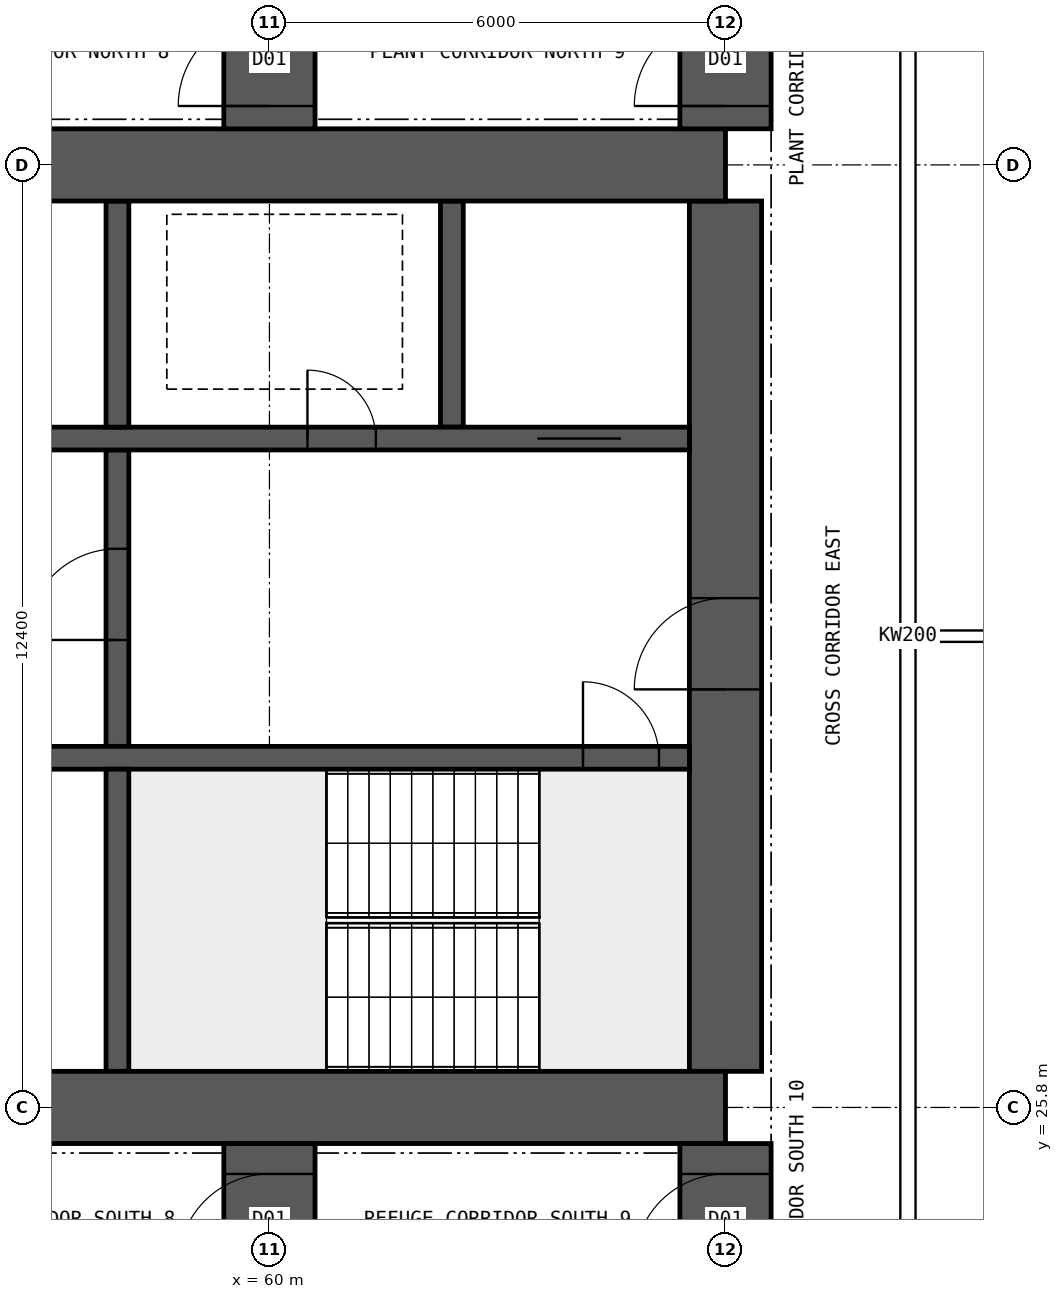
"""IFC4 building model, lengths in metres.
Left out: names, types, materials, properties, quantities, classifications, styles, units other than length and angle.
Written with IfcOpenShell. Run it as: python <this file> out.ifc"""

import sys

from ifc_helpers import new_model, si_unit, direction, frame, frame_2d, origin, place, context, subcontext, project, spatial, polyline, rectangle, outline, extrude, element, fill, save


model = new_model("IFC4")
c1 = context("Model", 3, precision=1e-05, world=origin(), true_north=direction((0.0, 1.0)))
c2 = subcontext(c1, "Body", "Model", "MODEL_VIEW")
j1 = project(units=[si_unit("LENGTHUNIT", "METRE"), si_unit("PLANEANGLEUNIT", "RADIAN")], contexts=[c1])
p1 = place(None, origin())
s1 = spatial("IfcSite", under=j1, at=p1, CompositionType="ELEMENT")
p2 = place(p1, origin())
s2 = spatial("IfcBuilding", under=s1, at=p2, CompositionType="ELEMENT")
p3 = place(p2, frame((0.0, 0.0, 133.15)))
s3 = spatial("IfcBuildingStorey", under=s2, at=p3, CompositionType="ELEMENT", Elevation=133.15)
for number, where, z_axis, x_axis in (
    (1, (18.0, 25.8, 0.0), (0.0, 0.0, 1.0), (1.0, 0.0, 0.0)),
    (2, (18.0, 38.2, 0.0), (0.0, 0.0, 1.0), (1.0, 0.0, 0.0)),
):
    element("IfcWall", number, at=place(p3, frame(where, z_axis=z_axis, x_axis=x_axis)), inside=s3, PredefinedType="SHEAR", context=c2, shape_type="SweptSolid", body=[
        extrude(rectangle(XDim=48.0, YDim=0.95, at=frame_2d((24.0, 0.0))), origin(), (0.0, 0.0, 1.0), 7.2),
    ])
p4 = place(p3, frame((66.0, 26.275, 0.0), z_axis=(0.0, 0.0, 1.0), x_axis=(0.0, 1.0, 0.0)))
e3 = element("IfcWall", 3, at=p4, inside=s3, PredefinedType="SHEAR", context=c2, shape_type="SweptSolid", body=[
    extrude(rectangle(XDim=11.45, YDim=0.95, at=frame_2d((5.725, 0.0))), origin(), (0.0, 0.0, 1.0), 7.2),
])
p5 = place(p4, frame((5.025, 0.0, 0.0)))
e4 = element("IfcOpeningElement", 4, at=p5, cuts=e3, PredefinedType="OPENING", context=c2, shape_type="SweptSolid", body=[
    extrude(rectangle(XDim=1.2, YDim=2.1, at=frame_2d((0.6, 1.05))), frame((0.0, 0.485, 0.0), z_axis=(0.0, -1.0, 0.0), x_axis=(1.0, 0.0, 0.0)), (0.0, 0.0, 1.0), 0.97),
])
p6 = place(p3, frame((18.475, 30.4, 0.0), z_axis=(0.0, 0.0, 1.0), x_axis=(1.0, 0.0, 0.0)))
e5 = element("IfcWall", 5, at=p6, inside=s3, PredefinedType="SHEAR", context=c2, shape_type="SweptSolid", body=[
    extrude(rectangle(XDim=47.05, YDim=0.3, at=frame_2d((23.525, 0.0))), origin(), (0.0, 0.0, 1.0), 7.2),
])
p7 = place(p6, frame((0.4, 0.0, 0.0)))
e6 = element("IfcOpeningElement", 6, at=p7, cuts=e5, PredefinedType="OPENING", context=c2, shape_type="SweptSolid", body=[
    extrude(rectangle(XDim=1.0, YDim=2.1, at=frame_2d((0.5, 1.05))), frame((0.0, 0.16, 0.0), z_axis=(0.0, -1.0, 0.0), x_axis=(1.0, 0.0, 0.0)), (0.0, 0.0, 1.0), 0.32),
])
p8 = place(p6, frame((45.65, 0.0, 0.0)))
e7 = element("IfcOpeningElement", 7, at=p8, cuts=e5, PredefinedType="OPENING", context=c2, shape_type="SweptSolid", body=[
    extrude(rectangle(XDim=1.0, YDim=2.1, at=frame_2d((0.5, 1.05))), frame((0.0, 0.16, 0.0), z_axis=(0.0, -1.0, 0.0), x_axis=(1.0, 0.0, 0.0)), (0.0, 0.0, 1.0), 0.32),
])
p9 = place(p6, frame((18.85, 0.0, 0.0)))
e8 = element("IfcOpeningElement", 8, at=p9, cuts=e5, PredefinedType="OPENING", context=c2, shape_type="SweptSolid", body=[
    extrude(rectangle(XDim=0.9, YDim=2.1, at=frame_2d((0.45, 1.05))), frame((0.0, 0.16, 0.0), z_axis=(0.0, -1.0, 0.0), x_axis=(1.0, 0.0, 0.0)), (0.0, 0.0, 1.0), 0.32),
])
p10 = place(p6, frame((30.142, 0.0, 0.0)))
e9 = element("IfcOpeningElement", 9, at=p10, cuts=e5, PredefinedType="OPENING", context=c2, shape_type="SweptSolid", body=[
    extrude(rectangle(XDim=1.1, YDim=2.1, at=frame_2d((0.55, 1.05))), frame((0.0, 0.16, 0.0), z_axis=(0.0, -1.0, 0.0), x_axis=(1.0, 0.0, 0.0)), (0.0, 0.0, 1.0), 0.32),
])
p11 = place(p6, frame((33.675, 0.0, 0.0)))
e10 = element("IfcOpeningElement", 10, at=p11, cuts=e5, PredefinedType="OPENING", context=c2, shape_type="SweptSolid", body=[
    extrude(rectangle(XDim=1.1, YDim=2.1, at=frame_2d((0.55, 1.05))), frame((0.0, 0.16, 0.0), z_axis=(0.0, -1.0, 0.0), x_axis=(1.0, 0.0, 0.0)), (0.0, 0.0, 1.0), 0.32),
])
p12 = place(p6, frame((37.208, 0.0, 0.0)))
e11 = element("IfcOpeningElement", 11, at=p12, cuts=e5, PredefinedType="OPENING", context=c2, shape_type="SweptSolid", body=[
    extrude(rectangle(XDim=1.1, YDim=2.1, at=frame_2d((0.55, 1.05))), frame((0.0, 0.16, 0.0), z_axis=(0.0, -1.0, 0.0), x_axis=(1.0, 0.0, 0.0)), (0.0, 0.0, 1.0), 0.32),
])
p13 = place(p3, frame((18.475, 34.6, 0.0), z_axis=(0.0, 0.0, 1.0), x_axis=(1.0, 0.0, 0.0)))
e12 = element("IfcWall", 12, at=p13, inside=s3, PredefinedType="SHEAR", context=c2, shape_type="SweptSolid", body=[
    extrude(rectangle(XDim=47.05, YDim=0.3, at=frame_2d((23.525, 0.0))), origin(), (0.0, 0.0, 1.0), 7.2),
])
p14 = place(p13, frame((0.9, 0.0, 0.0)))
e13 = element("IfcOpeningElement", 13, at=p14, cuts=e12, PredefinedType="OPENING", context=c2, shape_type="SweptSolid", body=[
    extrude(rectangle(XDim=1.1, YDim=2.1, at=frame_2d((0.55, 1.05))), frame((0.0, 0.16, 0.0), z_axis=(0.0, -1.0, 0.0), x_axis=(1.0, 0.0, 0.0)), (0.0, 0.0, 1.0), 0.32),
])
p15 = place(p13, frame((45.05, 0.0, 0.0)))
e14 = element("IfcOpeningElement", 14, at=p15, cuts=e12, PredefinedType="OPENING", context=c2, shape_type="SweptSolid", body=[
    extrude(rectangle(XDim=1.1, YDim=2.1, at=frame_2d((0.55, 1.05))), frame((0.0, 0.16, 0.0), z_axis=(0.0, -1.0, 0.0), x_axis=(1.0, 0.0, 0.0)), (0.0, 0.0, 1.0), 0.32),
])
p16 = place(p13, frame((4.125, 0.0, 0.0)))
e15 = element("IfcOpeningElement", 15, at=p16, cuts=e12, PredefinedType="OPENING", context=c2, shape_type="SweptSolid", body=[
    extrude(rectangle(XDim=0.9, YDim=2.1, at=frame_2d((0.45, 1.05))), frame((0.0, 0.16, 0.0), z_axis=(0.0, -1.0, 0.0), x_axis=(1.0, 0.0, 0.0)), (0.0, 0.0, 1.0), 0.32),
])
p17 = place(p13, frame((42.025, 0.0, 0.0)))
e16 = element("IfcOpeningElement", 16, at=p17, cuts=e12, PredefinedType="OPENING", context=c2, shape_type="SweptSolid", body=[
    extrude(rectangle(XDim=0.9, YDim=2.1, at=frame_2d((0.45, 1.05))), frame((0.0, 0.16, 0.0), z_axis=(0.0, -1.0, 0.0), x_axis=(1.0, 0.0, 0.0)), (0.0, 0.0, 1.0), 0.32),
])
p18 = place(p13, frame((8.9, 0.0, 0.0)))
e17 = element("IfcOpeningElement", 17, at=p18, cuts=e12, PredefinedType="OPENING", context=c2, shape_type="SweptSolid", body=[
    extrude(rectangle(XDim=0.9, YDim=2.1, at=frame_2d((0.45, 1.05))), frame((0.0, 0.16, 0.0), z_axis=(0.0, -1.0, 0.0), x_axis=(1.0, 0.0, 0.0)), (0.0, 0.0, 1.0), 0.32),
])
p19 = place(p13, frame((12.874, 0.0, 0.0)))
e18 = element("IfcOpeningElement", 18, at=p19, cuts=e12, PredefinedType="OPENING", context=c2, shape_type="SweptSolid", body=[
    extrude(rectangle(XDim=0.9, YDim=2.1, at=frame_2d((0.45, 1.05))), frame((0.0, 0.16, 0.0), z_axis=(0.0, -1.0, 0.0), x_axis=(1.0, 0.0, 0.0)), (0.0, 0.0, 1.0), 0.32),
])
p20 = place(p13, frame((16.521, 0.0, 0.0)))
e19 = element("IfcOpeningElement", 19, at=p20, cuts=e12, PredefinedType="OPENING", context=c2, shape_type="SweptSolid", body=[
    extrude(rectangle(XDim=0.9, YDim=2.1, at=frame_2d((0.45, 1.05))), frame((0.0, 0.16, 0.0), z_axis=(0.0, -1.0, 0.0), x_axis=(1.0, 0.0, 0.0)), (0.0, 0.0, 1.0), 0.32),
])
p21 = place(p13, frame((20.28, 0.0, 0.0)))
e20 = element("IfcOpeningElement", 20, at=p21, cuts=e12, PredefinedType="OPENING", context=c2, shape_type="SweptSolid", body=[
    extrude(rectangle(XDim=0.9, YDim=2.1, at=frame_2d((0.45, 1.05))), frame((0.0, 0.16, 0.0), z_axis=(0.0, -1.0, 0.0), x_axis=(1.0, 0.0, 0.0)), (0.0, 0.0, 1.0), 0.32),
])
p22 = place(p13, frame((24.686, 0.0, 0.0)))
e21 = element("IfcOpeningElement", 21, at=p22, cuts=e12, PredefinedType="OPENING", context=c2, shape_type="SweptSolid", body=[
    extrude(rectangle(XDim=0.9, YDim=2.1, at=frame_2d((0.45, 1.05))), frame((0.0, 0.16, 0.0), z_axis=(0.0, -1.0, 0.0), x_axis=(1.0, 0.0, 0.0)), (0.0, 0.0, 1.0), 0.32),
])
p23 = place(p13, frame((27.483, 0.0, 0.0)))
e22 = element("IfcOpeningElement", 22, at=p23, cuts=e12, PredefinedType="OPENING", context=c2, shape_type="SweptSolid", body=[
    extrude(rectangle(XDim=0.9, YDim=2.1, at=frame_2d((0.45, 1.05))), frame((0.0, 0.16, 0.0), z_axis=(0.0, -1.0, 0.0), x_axis=(1.0, 0.0, 0.0)), (0.0, 0.0, 1.0), 0.32),
])
p24 = place(p13, frame((33.604, 0.0, 0.0)))
e23 = element("IfcOpeningElement", 23, at=p24, cuts=e12, PredefinedType="OPENING", context=c2, shape_type="SweptSolid", body=[
    extrude(rectangle(XDim=0.9, YDim=2.1, at=frame_2d((0.45, 1.05))), frame((0.0, 0.16, 0.0), z_axis=(0.0, -1.0, 0.0), x_axis=(1.0, 0.0, 0.0)), (0.0, 0.0, 1.0), 0.32),
])
p25 = place(p3, frame((58.0, 26.275, 0.0), z_axis=(0.0, 0.0, 1.0), x_axis=(0.0, 1.0, 0.0)))
e24 = element("IfcWall", 24, at=p25, inside=s3, PredefinedType="SHEAR", context=c2, shape_type="SweptSolid", body=[
    extrude(rectangle(XDim=3.975, YDim=0.3, at=frame_2d((1.988, 0.0))), origin(), (0.0, 0.0, 1.0), 7.2),
])
p26 = place(p3, frame((58.0, 30.55, 0.0), z_axis=(0.0, 0.0, 1.0), x_axis=(0.0, 1.0, 0.0)))
e25 = element("IfcWall", 25, at=p26, inside=s3, PredefinedType="SHEAR", context=c2, shape_type="SweptSolid", body=[
    extrude(rectangle(XDim=3.9, YDim=0.3, at=frame_2d((1.95, 0.0))), origin(), (0.0, 0.0, 1.0), 7.2),
])
p27 = place(p26, frame((1.4, 0.0, 0.0)))
e26 = element("IfcOpeningElement", 26, at=p27, cuts=e25, PredefinedType="OPENING", context=c2, shape_type="SweptSolid", body=[
    extrude(rectangle(XDim=1.2, YDim=2.1, at=frame_2d((0.6, 1.05))), frame((0.0, 0.16, 0.0), z_axis=(0.0, -1.0, 0.0), x_axis=(1.0, 0.0, 0.0)), (0.0, 0.0, 1.0), 0.32),
])
for number, where, z_axis, x_axis in (
    (27, (62.4, 34.75, 0.0), (0.0, 0.0, 1.0), (0.0, 1.0, 0.0)),
    (28, (58.0, 34.75, 0.0), (0.0, 0.0, 1.0), (0.0, 1.0, 0.0)),
):
    element("IfcWall", number, at=place(p3, frame(where, z_axis=z_axis, x_axis=x_axis)), inside=s3, PredefinedType="SHEAR", context=c2, shape_type="SweptSolid", body=[
        extrude(rectangle(XDim=2.975, YDim=0.3, at=frame_2d((1.488, 0.0))), origin(), (0.0, 0.0, 1.0), 7.2),
    ])
p28 = place(p3, frame((60.0, 8.9, 0.0), z_axis=(0.0, 0.0, 1.0), x_axis=(0.0, 1.0, 0.0)))
e29 = element("IfcWall", 29, at=p28, inside=s3, PredefinedType="SHEAR", context=c2, shape_type="SweptSolid", body=[
    extrude(rectangle(XDim=16.425, YDim=1.2, at=frame_2d((8.212, 0.0))), origin(), (0.0, 0.0, 1.0), 7.2),
])
p29 = place(p28, frame((14.825, 0.0, 0.0)))
e30 = element("IfcOpeningElement", 30, at=p29, cuts=e29, PredefinedType="OPENING", context=c2, shape_type="SweptSolid", body=[
    extrude(rectangle(XDim=1.2, YDim=2.1, at=frame_2d((0.6, 1.05))), frame((0.0, 0.61, 0.0), z_axis=(0.0, -1.0, 0.0), x_axis=(1.0, 0.0, 0.0)), (0.0, 0.0, 1.0), 1.22),
])
p30 = place(p3, frame((60.0, 38.675, 0.0), z_axis=(0.0, 0.0, 1.0), x_axis=(0.0, 1.0, 0.0)))
e31 = element("IfcWall", 31, at=p30, inside=s3, PredefinedType="SHEAR", context=c2, shape_type="SweptSolid", body=[
    extrude(rectangle(XDim=16.425, YDim=1.2, at=frame_2d((8.212, 0.0))), origin(), (0.0, 0.0, 1.0), 7.2),
])
p31 = place(p30, frame((0.3, 0.0, 0.0)))
e32 = element("IfcOpeningElement", 32, at=p31, cuts=e31, PredefinedType="OPENING", context=c2, shape_type="SweptSolid", body=[
    extrude(rectangle(XDim=1.2, YDim=2.1, at=frame_2d((0.6, 1.05))), frame((0.0, 0.61, 0.0), z_axis=(0.0, -1.0, 0.0), x_axis=(1.0, 0.0, 0.0)), (0.0, 0.0, 1.0), 1.22),
])
p32 = place(p3, frame((66.0, 8.9, 0.0), z_axis=(0.0, 0.0, 1.0), x_axis=(0.0, 1.0, 0.0)))
e33 = element("IfcWall", 33, at=p32, inside=s3, PredefinedType="SHEAR", context=c2, shape_type="SweptSolid", body=[
    extrude(rectangle(XDim=16.425, YDim=1.2, at=frame_2d((8.212, 0.0))), origin(), (0.0, 0.0, 1.0), 7.2),
])
p33 = place(p32, frame((14.825, 0.0, 0.0)))
e34 = element("IfcOpeningElement", 34, at=p33, cuts=e33, PredefinedType="OPENING", context=c2, shape_type="SweptSolid", body=[
    extrude(rectangle(XDim=1.2, YDim=2.1, at=frame_2d((0.6, 1.05))), frame((0.0, 0.61, 0.0), z_axis=(0.0, -1.0, 0.0), x_axis=(1.0, 0.0, 0.0)), (0.0, 0.0, 1.0), 1.22),
])
p34 = place(p32, frame((3.85, 0.0, 0.0)))
e35 = element("IfcOpeningElement", 35, at=p34, cuts=e33, PredefinedType="OPENING", context=c2, shape_type="SweptSolid", body=[
    extrude(rectangle(XDim=1.2, YDim=2.1, at=frame_2d((0.6, 1.05))), frame((0.0, 0.61, 0.0), z_axis=(0.0, -1.0, 0.0), x_axis=(1.0, 0.0, 0.0)), (0.0, 0.0, 1.0), 1.22),
])
p35 = place(p3, frame((66.0, 38.675, 0.0), z_axis=(0.0, 0.0, 1.0), x_axis=(0.0, 1.0, 0.0)))
e36 = element("IfcWall", 36, at=p35, inside=s3, PredefinedType="SHEAR", context=c2, shape_type="SweptSolid", body=[
    extrude(rectangle(XDim=16.425, YDim=1.2, at=frame_2d((8.212, 0.0))), origin(), (0.0, 0.0, 1.0), 7.2),
])
p36 = place(p35, frame((0.3, 0.0, 0.0)))
e37 = element("IfcOpeningElement", 37, at=p36, cuts=e36, PredefinedType="OPENING", context=c2, shape_type="SweptSolid", body=[
    extrude(rectangle(XDim=1.2, YDim=2.1, at=frame_2d((0.6, 1.05))), frame((0.0, 0.61, 0.0), z_axis=(0.0, -1.0, 0.0), x_axis=(1.0, 0.0, 0.0)), (0.0, 0.0, 1.0), 1.22),
])
p37 = place(p35, frame((11.375, 0.0, 0.0)))
e38 = element("IfcOpeningElement", 38, at=p37, cuts=e36, PredefinedType="OPENING", context=c2, shape_type="SweptSolid", body=[
    extrude(rectangle(XDim=1.2, YDim=2.1, at=frame_2d((0.6, 1.05))), frame((0.0, 0.61, 0.0), z_axis=(0.0, -1.0, 0.0), x_axis=(1.0, 0.0, 0.0)), (0.0, 0.0, 1.0), 1.22),
])
p38 = place(p3, frame((68.4, 23.425, 0.0), z_axis=(0.0, 0.0, 1.0), x_axis=(0.0, 1.0, 0.0)))
e39 = element("IfcWall", 39, at=p38, inside=s3, PredefinedType="SOLIDWALL", context=c2, shape_type="SweptSolid", body=[
    extrude(rectangle(XDim=17.15, YDim=0.2, at=frame_2d((8.575, 0.0))), origin(), (0.0, 0.0, 1.0), 6.9),
])
p39 = place(p3, frame((68.5, 32.0, 0.0), z_axis=(0.0, 0.0, 1.0), x_axis=(1.0, 0.0, 0.0)))
e40 = element("IfcWall", 40, at=p39, inside=s3, PredefinedType="PARTITIONING", context=c2, shape_type="SweptSolid", body=[
    extrude(outline(polyline([(0.0, 0.0), (6.795, 0.0), (6.795, 6.9), (3.802, 6.9), (3.8, 6.45), (3.202, 6.45), (3.2, 6.9), (0.0, 6.9), (0.0, 0.0)])), frame((0.0, 0.075, 0.0), z_axis=(0.0, -1.0, 0.0), x_axis=(1.0, 0.0, 0.0)), (0.0, 0.0, 1.0), 0.15),
])
p40 = place(p5, origin())
e41 = element("IfcDoor", 41, at=p40, inside=s3, OperationType="SINGLE_SWING_LEFT", PredefinedType="DOOR", context=c2, shape_type="SweptSolid", body=[
    extrude(rectangle(XDim=1.2, YDim=2.1, at=frame_2d((0.6, 1.05))), frame((0.0, 0.025, 0.0), z_axis=(0.0, -1.0, 0.0), x_axis=(1.0, 0.0, 0.0)), (0.0, 0.0, 1.0), 0.05),
])
fill(e4, e41)
p41 = place(p8, origin())
e42 = element("IfcDoor", 42, at=p41, inside=s3, OperationType="SINGLE_SWING_LEFT", PredefinedType="DOOR", context=c2, shape_type="SweptSolid", body=[
    extrude(rectangle(XDim=1.0, YDim=2.1, at=frame_2d((0.5, 1.05))), frame((0.0, 0.025, 0.0), z_axis=(0.0, -1.0, 0.0), x_axis=(1.0, 0.0, 0.0)), (0.0, 0.0, 1.0), 0.05),
])
fill(e7, e42)
p42 = place(p15, origin())
e43 = element("IfcDoor", 43, at=p42, inside=s3, OperationType="DOUBLE_DOOR_SLIDING", PredefinedType="DOOR", context=c2, shape_type="SweptSolid", body=[
    extrude(rectangle(XDim=1.1, YDim=2.1, at=frame_2d((0.55, 1.05))), frame((0.0, 0.025, 0.0), z_axis=(0.0, -1.0, 0.0), x_axis=(1.0, 0.0, 0.0)), (0.0, 0.0, 1.0), 0.05),
])
fill(e14, e43)
p43 = place(p17, origin())
e44 = element("IfcDoor", 44, at=p43, inside=s3, OperationType="SINGLE_SWING_LEFT", PredefinedType="DOOR", context=c2, shape_type="SweptSolid", body=[
    extrude(rectangle(XDim=0.9, YDim=2.1, at=frame_2d((0.45, 1.05))), frame((0.0, 0.025, 0.0), z_axis=(0.0, -1.0, 0.0), x_axis=(1.0, 0.0, 0.0)), (0.0, 0.0, 1.0), 0.05),
])
fill(e16, e44)
p44 = place(p27, origin())
e45 = element("IfcDoor", 45, at=p44, inside=s3, OperationType="SINGLE_SWING_LEFT", PredefinedType="DOOR", context=c2, shape_type="SweptSolid", body=[
    extrude(rectangle(XDim=1.2, YDim=2.1, at=frame_2d((0.6, 1.05))), frame((0.0, 0.025, 0.0), z_axis=(0.0, -1.0, 0.0), x_axis=(1.0, 0.0, 0.0)), (0.0, 0.0, 1.0), 0.05),
])
fill(e26, e45)
p45 = place(p29, origin())
e46 = element("IfcDoor", 46, at=p45, inside=s3, OperationType="SINGLE_SWING_LEFT", PredefinedType="DOOR", context=c2, shape_type="SweptSolid", body=[
    extrude(rectangle(XDim=1.2, YDim=2.1, at=frame_2d((0.6, 1.05))), frame((0.0, 0.025, 0.0), z_axis=(0.0, -1.0, 0.0), x_axis=(1.0, 0.0, 0.0)), (0.0, 0.0, 1.0), 0.05),
])
fill(e30, e46)
p46 = place(p33, origin())
e47 = element("IfcDoor", 47, at=p46, inside=s3, OperationType="SINGLE_SWING_LEFT", PredefinedType="DOOR", context=c2, shape_type="SweptSolid", body=[
    extrude(rectangle(XDim=1.2, YDim=2.1, at=frame_2d((0.6, 1.05))), frame((0.0, 0.025, 0.0), z_axis=(0.0, -1.0, 0.0), x_axis=(1.0, 0.0, 0.0)), (0.0, 0.0, 1.0), 0.05),
])
fill(e34, e47)
p47 = place(p31, origin())
e48 = element("IfcDoor", 48, at=p47, inside=s3, OperationType="SINGLE_SWING_LEFT", PredefinedType="DOOR", context=c2, shape_type="SweptSolid", body=[
    extrude(rectangle(XDim=1.2, YDim=2.1, at=frame_2d((0.6, 1.05))), frame((0.0, 0.025, 0.0), z_axis=(0.0, -1.0, 0.0), x_axis=(1.0, 0.0, 0.0)), (0.0, 0.0, 1.0), 0.05),
])
fill(e32, e48)
p48 = place(p36, origin())
e49 = element("IfcDoor", 49, at=p48, inside=s3, OperationType="SINGLE_SWING_LEFT", PredefinedType="DOOR", context=c2, shape_type="SweptSolid", body=[
    extrude(rectangle(XDim=1.2, YDim=2.1, at=frame_2d((0.6, 1.05))), frame((0.0, 0.025, 0.0), z_axis=(0.0, -1.0, 0.0), x_axis=(1.0, 0.0, 0.0)), (0.0, 0.0, 1.0), 0.05),
])
fill(e37, e49)
save(model, sys.argv[1])
